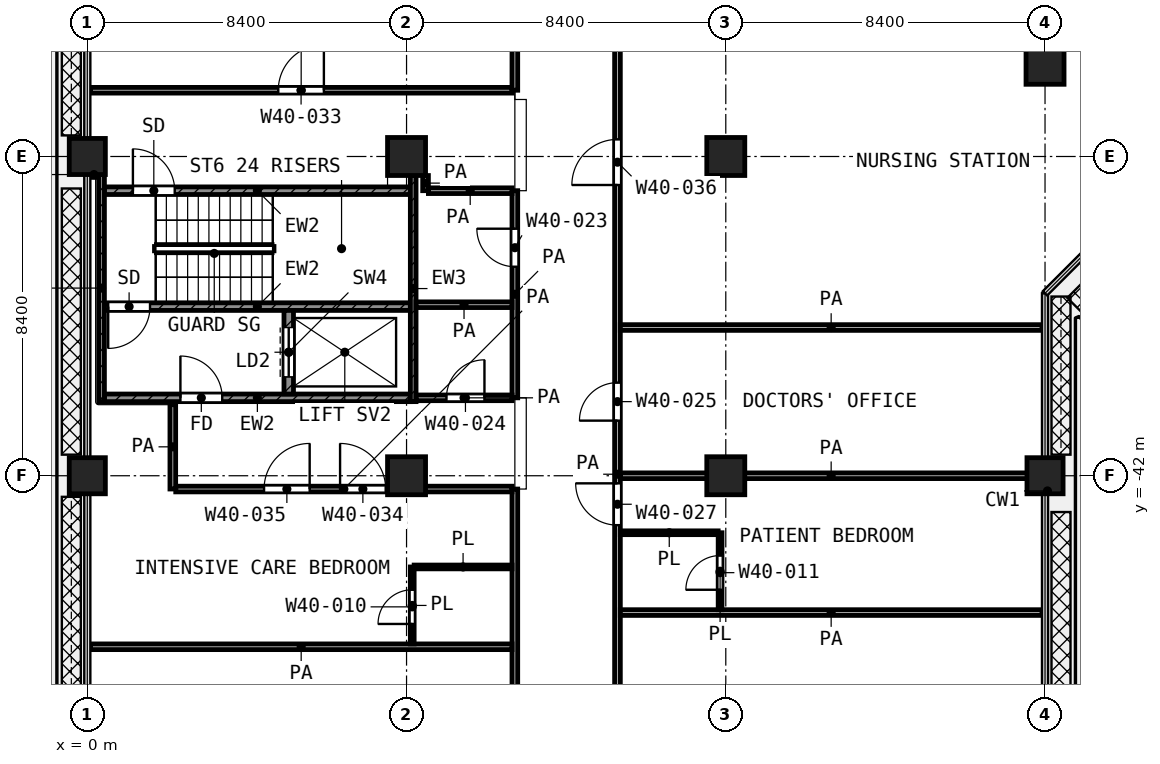
"""IFC4 building model, lengths in metres.
Left out: names, types, materials, properties, quantities, classifications, styles, units other than length and angle.
Written with IfcOpenShell. Run it as: python <this file> out.ifc"""

import sys

from ifc_helpers import new_model, si_unit, direction, frame, frame_2d, origin, origin_2d, place, context, subcontext, project, spatial, rectangle, extrude, element, fill, save


model = new_model("IFC4")
c1 = context("Model", 3, precision=1e-05, world=origin(), true_north=direction((0.0, 1.0)))
c2 = subcontext(c1, "Body", "Model", "MODEL_VIEW")
j1 = project(units=[si_unit("LENGTHUNIT", "METRE"), si_unit("PLANEANGLEUNIT", "RADIAN")], contexts=[c1])
p1 = place(None, origin())
s1 = spatial("IfcSite", under=j1, at=p1, CompositionType="ELEMENT")
p2 = place(p1, origin())
s2 = spatial("IfcBuilding", under=s1, at=p2, CompositionType="ELEMENT")
p3 = place(p2, frame((0.0, 0.0, 175.2)))
s3 = spatial("IfcBuildingStorey", under=s2, at=p3, CompositionType="ELEMENT", Elevation=175.2)
p4 = place(p3, frame((25.2, -31.2, 0.0), z_axis=(0.0, 0.0, 1.0), x_axis=(1.0, 0.0, 0.0)))
e1 = element("IfcColumn", 1, at=p4, inside=s3, PredefinedType="COLUMN", context=c2, shape_type="SweptSolid", body=[
    extrude(rectangle(XDim=1.0, YDim=1.0, at=origin_2d()), origin(), (0.0, 0.0, 1.0), 4.2),
])
p5 = place(p3, frame((0.0, -33.6, 0.0), z_axis=(0.0, 0.0, 1.0), x_axis=(1.0, 0.0, 0.0)))
e2 = element("IfcColumn", 2, at=p5, inside=s3, PredefinedType="COLUMN", context=c2, shape_type="SweptSolid", body=[
    extrude(rectangle(XDim=0.95, YDim=0.95, at=origin_2d()), origin(), (0.0, 0.0, 1.0), 4.2),
])
for number, where, z_axis, x_axis in (
    (3, (8.4, -33.6, 0.0), (0.0, 0.0, 1.0), (1.0, 0.0, 0.0)),
    (4, (16.8, -33.6, 0.0), (0.0, 0.0, 1.0), (1.0, 0.0, 0.0)),
):
    element("IfcColumn", number, at=place(p3, frame(where, z_axis=z_axis, x_axis=x_axis)), inside=s3, PredefinedType="COLUMN", context=c2, shape_type="SweptSolid", body=[
        extrude(rectangle(XDim=1.0, YDim=1.0, at=origin_2d()), origin(), (0.0, 0.0, 1.0), 4.2),
    ])
p6 = place(p3, frame((0.0, -42.0, 0.0), z_axis=(0.0, 0.0, 1.0), x_axis=(1.0, 0.0, 0.0)))
e5 = element("IfcColumn", 5, at=p6, inside=s3, PredefinedType="COLUMN", context=c2, shape_type="SweptSolid", body=[
    extrude(rectangle(XDim=0.95, YDim=0.95, at=origin_2d()), origin(), (0.0, 0.0, 1.0), 4.2),
])
for number, where, z_axis, x_axis in (
    (6, (8.4, -42.0, 0.0), (0.0, 0.0, 1.0), (1.0, 0.0, 0.0)),
    (7, (16.8, -42.0, 0.0), (0.0, 0.0, 1.0), (1.0, 0.0, 0.0)),
):
    element("IfcColumn", number, at=place(p3, frame(where, z_axis=z_axis, x_axis=x_axis)), inside=s3, PredefinedType="COLUMN", context=c2, shape_type="SweptSolid", body=[
        extrude(rectangle(XDim=1.0, YDim=1.0, at=origin_2d()), origin(), (0.0, 0.0, 1.0), 4.2),
    ])
p7 = place(p3, frame((25.2, -42.0, 0.0), z_axis=(0.0, 0.0, 1.0), x_axis=(1.0, 0.0, 0.0)))
e8 = element("IfcColumn", 8, at=p7, inside=s3, PredefinedType="COLUMN", context=c2, shape_type="SweptSolid", body=[
    extrude(rectangle(XDim=0.95, YDim=0.95, at=origin_2d()), origin(), (0.0, 0.0, 1.0), 4.2),
])
p8 = place(p3, frame((0.375, -40.05, 0.0), z_axis=(0.0, 0.0, 1.0), x_axis=(0.0, 1.0, 0.0)))
e9 = element("IfcWall", 9, at=p8, inside=s3, PredefinedType="SHEAR", context=c2, shape_type="SweptSolid", body=[
    extrude(rectangle(XDim=5.975, YDim=0.15, at=frame_2d((2.988, 0.0))), origin(), (0.0, 0.0, 1.0), 3.6),
])
p9 = place(p3, frame((8.575, -40.05, 0.0), z_axis=(0.0, 0.0, 1.0), x_axis=(0.0, 1.0, 0.0)))
e10 = element("IfcWall", 10, at=p9, inside=s3, PredefinedType="SHEAR", context=c2, shape_type="SweptSolid", body=[
    extrude(rectangle(XDim=5.95, YDim=0.15, at=frame_2d((2.975, 0.0))), origin(), (0.0, 0.0, 1.0), 3.6),
])
p10 = place(p3, frame((0.45, -34.5, 0.0), z_axis=(0.0, 0.0, 1.0), x_axis=(1.0, 0.0, 0.0)))
e11 = element("IfcWall", 11, at=p10, inside=s3, PredefinedType="SHEAR", context=c2, shape_type="SweptSolid", body=[
    extrude(rectangle(XDim=8.05, YDim=0.2, at=frame_2d((4.025, 0.0))), origin(), (0.0, 0.0, 1.0), 3.6),
])
p11 = place(p10, frame((0.75, 0.0, 0.0)))
e12 = element("IfcOpeningElement", 12, at=p11, cuts=e11, PredefinedType="OPENING", context=c2, shape_type="SweptSolid", body=[
    extrude(rectangle(XDim=1.1, YDim=2.1, at=frame_2d((0.55, 1.05))), frame((0.0, 0.11, 0.0), z_axis=(0.0, -1.0, 0.0), x_axis=(1.0, 0.0, 0.0)), (0.0, 0.0, 1.0), 0.22),
])
p12 = place(p3, frame((0.45, -37.55, 0.0), z_axis=(0.0, 0.0, 1.0), x_axis=(1.0, 0.0, 0.0)))
e13 = element("IfcWall", 13, at=p12, inside=s3, PredefinedType="SHEAR", context=c2, shape_type="SweptSolid", body=[
    extrude(rectangle(XDim=8.05, YDim=0.2, at=frame_2d((4.025, 0.0))), origin(), (0.0, 0.0, 1.0), 3.6),
])
p13 = place(p12, frame((0.1, 0.0, 0.0)))
e14 = element("IfcOpeningElement", 14, at=p13, cuts=e13, PredefinedType="OPENING", context=c2, shape_type="SweptSolid", body=[
    extrude(rectangle(XDim=1.1, YDim=2.1, at=frame_2d((0.55, 1.05))), frame((0.0, 0.11, 0.0), z_axis=(0.0, -1.0, 0.0), x_axis=(1.0, 0.0, 0.0)), (0.0, 0.0, 1.0), 0.22),
])
p14 = place(p3, frame((0.45, -39.95, 0.0), z_axis=(0.0, 0.0, 1.0), x_axis=(1.0, 0.0, 0.0)))
e15 = element("IfcWall", 15, at=p14, inside=s3, PredefinedType="SHEAR", context=c2, shape_type="SweptSolid", body=[
    extrude(rectangle(XDim=8.05, YDim=0.2, at=frame_2d((4.025, 0.0))), origin(), (0.0, 0.0, 1.0), 3.6),
])
p15 = place(p14, frame((2.0, 0.0, 0.0)))
e16 = element("IfcOpeningElement", 16, at=p15, cuts=e15, PredefinedType="OPENING", context=c2, shape_type="SweptSolid", body=[
    extrude(rectangle(XDim=1.1, YDim=2.1, at=frame_2d((0.55, 1.05))), frame((0.0, 0.11, 0.0), z_axis=(0.0, -1.0, 0.0), x_axis=(1.0, 0.0, 0.0)), (0.0, 0.0, 1.0), 0.22),
])
p16 = place(p3, frame((5.3, -39.85, 0.0), z_axis=(0.0, 0.0, 1.0), x_axis=(0.0, 1.0, 0.0)))
e17 = element("IfcWall", 17, at=p16, inside=s3, PredefinedType="SHEAR", context=c2, shape_type="SweptSolid", body=[
    extrude(rectangle(XDim=2.2, YDim=0.25, at=frame_2d((1.1, 0.0))), origin(), (0.0, 0.0, 1.0), 3.6),
])
p17 = place(p16, frame((0.45, 0.0, 0.0)))
e18 = element("IfcOpeningElement", 18, at=p17, cuts=e17, PredefinedType="OPENING", context=c2, shape_type="SweptSolid", body=[
    extrude(rectangle(XDim=1.3, YDim=2.1, at=frame_2d((0.65, 1.05))), frame((0.0, 0.135, 0.0), z_axis=(0.0, -1.0, 0.0), x_axis=(1.0, 0.0, 0.0)), (0.0, 0.0, 1.0), 0.27),
])
p18 = place(p3, frame((8.6, -44.4, 0.0), z_axis=(0.0, 0.0, 1.0), x_axis=(1.0, 0.0, 0.0)))
e19 = element("IfcWall", 19, at=p18, inside=s3, PredefinedType="PARTITIONING", context=c2, shape_type="SweptSolid", body=[
    extrude(rectangle(XDim=2.575, YDim=0.1, at=frame_2d((1.288, 0.0))), origin(), (0.0, 0.0, 1.0), 3.6),
])
p19 = place(p3, frame((14.025, -43.5, 0.0), z_axis=(0.0, 0.0, 1.0), x_axis=(1.0, 0.0, 0.0)))
e20 = element("IfcWall", 20, at=p19, inside=s3, PredefinedType="PARTITIONING", context=c2, shape_type="SweptSolid", body=[
    extrude(rectangle(XDim=2.575, YDim=0.1, at=frame_2d((1.288, 0.0))), origin(), (0.0, 0.0, 1.0), 3.6),
])
p20 = place(p3, frame((8.55, -46.425, 0.0), z_axis=(0.0, 0.0, 1.0), x_axis=(0.0, 1.0, 0.0)))
e21 = element("IfcWall", 21, at=p20, inside=s3, PredefinedType="PARTITIONING", context=c2, shape_type="SweptSolid", body=[
    extrude(rectangle(XDim=2.025, YDim=0.1, at=frame_2d((1.013, 0.0))), origin(), (0.0, 0.0, 1.0), 3.6),
])
p21 = place(p20, frame((0.525, 0.0, 0.0)))
e22 = element("IfcOpeningElement", 22, at=p21, cuts=e21, PredefinedType="OPENING", context=c2, shape_type="SweptSolid", body=[
    extrude(rectangle(XDim=0.9, YDim=2.1, at=frame_2d((0.45, 1.05))), frame((0.0, 0.06, 0.0), z_axis=(0.0, -1.0, 0.0), x_axis=(1.0, 0.0, 0.0)), (0.0, 0.0, 1.0), 0.12),
])
p22 = place(p3, frame((16.65, -45.525, 0.0), z_axis=(0.0, 0.0, 1.0), x_axis=(0.0, 1.0, 0.0)))
e23 = element("IfcWall", 23, at=p22, inside=s3, PredefinedType="PARTITIONING", context=c2, shape_type="SweptSolid", body=[
    extrude(rectangle(XDim=2.025, YDim=0.1, at=frame_2d((1.012, 0.0))), origin(), (0.0, 0.0, 1.0), 3.6),
])
p23 = place(p22, frame((0.525, 0.0, 0.0)))
e24 = element("IfcOpeningElement", 24, at=p23, cuts=e23, PredefinedType="OPENING", context=c2, shape_type="SweptSolid", body=[
    extrude(rectangle(XDim=0.9, YDim=2.1, at=frame_2d((0.45, 1.05))), frame((0.0, 0.06, 0.0), z_axis=(0.0, -1.0, 0.0), x_axis=(1.0, 0.0, 0.0)), (0.0, 0.0, 1.0), 0.12),
])
p24 = place(p3, frame((0.08, -46.5, 0.0), z_axis=(0.0, 0.0, 1.0), x_axis=(1.0, 0.0, 0.0)))
e25 = element("IfcWall", 25, at=p24, inside=s3, PredefinedType="PARTITIONING", context=c2, shape_type="SweptSolid", body=[
    extrude(rectangle(XDim=11.095, YDim=0.15, at=frame_2d((5.547, 0.0))), origin(), (0.0, 0.0, 1.0), 3.6),
])
p25 = place(p3, frame((14.025, -45.6, 0.0), z_axis=(0.0, 0.0, 1.0), x_axis=(1.0, 0.0, 0.0)))
e26 = element("IfcWall", 26, at=p25, inside=s3, PredefinedType="PARTITIONING", context=c2, shape_type="SweptSolid", body=[
    extrude(rectangle(XDim=11.095, YDim=0.15, at=frame_2d((5.548, 0.0))), origin(), (0.0, 0.0, 1.0), 3.6),
])
p26 = place(p3, frame((2.327, -42.35, 0.0), z_axis=(0.0, 0.0, 1.0), x_axis=(1.0, 0.0, 0.0)))
e27 = element("IfcWall", 27, at=p26, inside=s3, PredefinedType="PARTITIONING", context=c2, shape_type="SweptSolid", body=[
    extrude(rectangle(XDim=8.848, YDim=0.15, at=frame_2d((4.424, 0.0))), origin(), (0.0, 0.0, 1.0), 3.6),
])
p27 = place(p26, frame((4.324, 0.0, 0.0)))
e28 = element("IfcOpeningElement", 28, at=p27, cuts=e27, PredefinedType="OPENING", context=c2, shape_type="SweptSolid", body=[
    extrude(rectangle(XDim=1.2, YDim=2.1, at=frame_2d((0.6, 1.05))), frame((0.0, 0.085, 0.0), z_axis=(0.0, -1.0, 0.0), x_axis=(1.0, 0.0, 0.0)), (0.0, 0.0, 1.0), 0.17),
])
p28 = place(p26, frame((2.324, 0.0, 0.0)))
e29 = element("IfcOpeningElement", 29, at=p28, cuts=e27, PredefinedType="OPENING", context=c2, shape_type="SweptSolid", body=[
    extrude(rectangle(XDim=1.2, YDim=2.1, at=frame_2d((0.6, 1.05))), frame((0.0, 0.085, 0.0), z_axis=(0.0, -1.0, 0.0), x_axis=(1.0, 0.0, 0.0)), (0.0, 0.0, 1.0), 0.17),
])
p29 = place(p3, frame((14.025, -42.0, 0.0), z_axis=(0.0, 0.0, 1.0), x_axis=(1.0, 0.0, 0.0)))
e30 = element("IfcWall", 30, at=p29, inside=s3, PredefinedType="PARTITIONING", context=c2, shape_type="SweptSolid", body=[
    extrude(rectangle(XDim=11.095, YDim=0.15, at=frame_2d((5.548, 0.0))), origin(), (0.0, 0.0, 1.0), 3.6),
])
p30 = place(p3, frame((8.65, -39.95, 0.0), z_axis=(0.0, 0.0, 1.0), x_axis=(1.0, 0.0, 0.0)))
e31 = element("IfcWall", 31, at=p30, inside=s3, PredefinedType="PARTITIONING", context=c2, shape_type="SweptSolid", body=[
    extrude(rectangle(XDim=2.525, YDim=0.15, at=frame_2d((1.263, 0.0))), origin(), (0.0, 0.0, 1.0), 3.6),
])
p31 = place(p30, frame((0.8, 0.0, 0.0)))
e32 = element("IfcOpeningElement", 32, at=p31, cuts=e31, PredefinedType="OPENING", context=c2, shape_type="SweptSolid", body=[
    extrude(rectangle(XDim=1.0, YDim=2.1, at=frame_2d((0.5, 1.05))), frame((0.0, 0.085, 0.0), z_axis=(0.0, -1.0, 0.0), x_axis=(1.0, 0.0, 0.0)), (0.0, 0.0, 1.0), 0.17),
])
p32 = place(p3, frame((14.025, -38.1, 0.0), z_axis=(0.0, 0.0, 1.0), x_axis=(1.0, 0.0, 0.0)))
e33 = element("IfcWall", 33, at=p32, inside=s3, PredefinedType="PARTITIONING", context=c2, shape_type="SweptSolid", body=[
    extrude(rectangle(XDim=11.095, YDim=0.15, at=frame_2d((5.548, 0.0))), origin(), (0.0, 0.0, 1.0), 3.6),
])
p33 = place(p3, frame((8.65, -37.5, 0.0), z_axis=(0.0, 0.0, 1.0), x_axis=(1.0, 0.0, 0.0)))
e34 = element("IfcWall", 34, at=p33, inside=s3, PredefinedType="PARTITIONING", context=c2, shape_type="SweptSolid", body=[
    extrude(rectangle(XDim=2.525, YDim=0.15, at=frame_2d((1.263, 0.0))), origin(), (0.0, 0.0, 1.0), 3.6),
])
p34 = place(p3, frame((8.975, -34.5, 0.0), z_axis=(0.0, 0.0, 1.0), x_axis=(1.0, 0.0, 0.0)))
e35 = element("IfcWall", 35, at=p34, inside=s3, PredefinedType="PARTITIONING", context=c2, shape_type="SweptSolid", body=[
    extrude(rectangle(XDim=2.2, YDim=0.15, at=frame_2d((1.1, 0.0))), origin(), (0.0, 0.0, 1.0), 3.6),
])
p35 = place(p3, frame((0.08, -34.075, 0.0), z_axis=(0.0, 0.0, 1.0), x_axis=(1.0, 0.0, 0.0)))
e36 = element("IfcWall", 36, at=p35, inside=s3, PredefinedType="PARTITIONING", context=c2, shape_type="SweptSolid", body=[
    extrude(rectangle(XDim=0.19, YDim=0.15, at=frame_2d((0.095, 0.0))), origin(), (0.0, 0.0, 1.0), 3.6),
])
p36 = place(p3, frame((0.08, -31.857, 0.0), z_axis=(0.0, 0.0, 1.0), x_axis=(1.0, 0.0, 0.0)))
e37 = element("IfcWall", 37, at=p36, inside=s3, PredefinedType="PARTITIONING", context=c2, shape_type="SweptSolid", body=[
    extrude(rectangle(XDim=11.095, YDim=0.15, at=frame_2d((5.547, 0.0))), origin(), (0.0, 0.0, 1.0), 3.6),
])
p37 = place(p36, frame((4.945, 0.0, 0.0)))
e38 = element("IfcOpeningElement", 38, at=p37, cuts=e37, PredefinedType="OPENING", context=c2, shape_type="SweptSolid", body=[
    extrude(rectangle(XDim=1.2, YDim=2.1, at=frame_2d((0.6, 1.05))), frame((0.0, 0.085, 0.0), z_axis=(0.0, -1.0, 0.0), x_axis=(1.0, 0.0, 0.0)), (0.0, 0.0, 1.0), 0.17),
])
p38 = place(p3, frame((2.25, -42.349, 0.0), z_axis=(0.0, 0.0, 1.0), x_axis=(0.0, 1.0, 0.0)))
e39 = element("IfcWall", 39, at=p38, inside=s3, PredefinedType="PARTITIONING", context=c2, shape_type="SweptSolid", body=[
    extrude(rectangle(XDim=2.219, YDim=0.15, at=frame_2d((1.11, 0.0))), origin(), (0.0, 0.0, 1.0), 3.6),
])
p39 = place(p3, frame((8.9, -34.5, 0.0), z_axis=(0.0, 0.0, 1.0), x_axis=(0.0, 1.0, 0.0)))
e40 = element("IfcWall", 40, at=p39, inside=s3, PredefinedType="PARTITIONING", context=c2, shape_type="SweptSolid", body=[
    extrude(rectangle(XDim=0.399, YDim=0.15, at=frame_2d((0.199, 0.0))), origin(), (0.0, 0.0, 1.0), 3.6),
])
p40 = place(p3, frame((11.25, -54.52, 0.0), z_axis=(0.0, 0.0, 1.0), x_axis=(0.0, 1.0, 0.0)))
e41 = element("IfcWall", 41, at=p40, inside=s3, PredefinedType="PARTITIONING", context=c2, shape_type="SweptSolid", body=[
    extrude(rectangle(XDim=12.17, YDim=0.15, at=frame_2d((6.085, 0.0))), origin(), (0.0, 0.0, 1.0), 3.6),
])
p41 = place(p40, frame((3.22, 0.0, 0.0)))
e42 = element("IfcOpeningElement", 42, at=p41, cuts=e41, PredefinedType="OPENING", context=c2, shape_type="SweptSolid", body=[
    extrude(rectangle(XDim=1.5, YDim=2.1, at=frame_2d((0.75, 1.05))), frame((0.0, 0.085, 0.0), z_axis=(0.0, -1.0, 0.0), x_axis=(1.0, 0.0, 0.0)), (0.0, 0.0, 1.0), 0.17),
])
p42 = place(p3, frame((11.25, -39.95, 0.0), z_axis=(0.0, 0.0, 1.0), x_axis=(0.0, 1.0, 0.0)))
e43 = element("IfcWall", 43, at=p42, inside=s3, PredefinedType="PARTITIONING", context=c2, shape_type="SweptSolid", body=[
    extrude(rectangle(XDim=5.45, YDim=0.15, at=frame_2d((2.725, 0.0))), origin(), (0.0, 0.0, 1.0), 3.6),
])
p43 = place(p42, frame((3.45, 0.0, 0.0)))
e44 = element("IfcOpeningElement", 44, at=p43, cuts=e43, PredefinedType="OPENING", context=c2, shape_type="SweptSolid", body=[
    extrude(rectangle(XDim=1.0, YDim=2.1, at=frame_2d((0.5, 1.05))), frame((0.0, 0.085, 0.0), z_axis=(0.0, -1.0, 0.0), x_axis=(1.0, 0.0, 0.0)), (0.0, 0.0, 1.0), 0.17),
])
p44 = place(p3, frame((11.25, -31.857, 0.0), z_axis=(0.0, 0.0, 1.0), x_axis=(0.0, 1.0, 0.0)))
e45 = element("IfcWall", 45, at=p44, inside=s3, PredefinedType="PARTITIONING", context=c2, shape_type="SweptSolid", body=[
    extrude(rectangle(XDim=2.457, YDim=0.15, at=frame_2d((1.229, 0.0))), origin(), (0.0, 0.0, 1.0), 3.6),
])
p45 = place(p3, frame((13.95, -54.52, 0.0), z_axis=(0.0, 0.0, 1.0), x_axis=(0.0, 1.0, 0.0)))
e46 = element("IfcWall", 46, at=p45, inside=s3, PredefinedType="PARTITIONING", context=c2, shape_type="SweptSolid", body=[
    extrude(rectangle(XDim=25.12, YDim=0.15, at=frame_2d((12.56, 0.0))), origin(), (0.0, 0.0, 1.0), 3.6),
])
p46 = place(p45, frame((20.17, 0.0, 0.0)))
e47 = element("IfcOpeningElement", 47, at=p46, cuts=e46, PredefinedType="OPENING", context=c2, shape_type="SweptSolid", body=[
    extrude(rectangle(XDim=1.2, YDim=2.1, at=frame_2d((0.6, 1.05))), frame((0.0, 0.085, 0.0), z_axis=(0.0, -1.0, 0.0), x_axis=(1.0, 0.0, 0.0)), (0.0, 0.0, 1.0), 0.17),
])
p47 = place(p45, frame((13.97, 0.0, 0.0)))
e48 = element("IfcOpeningElement", 48, at=p47, cuts=e46, PredefinedType="OPENING", context=c2, shape_type="SweptSolid", body=[
    extrude(rectangle(XDim=1.0, YDim=2.1, at=frame_2d((0.5, 1.05))), frame((0.0, 0.085, 0.0), z_axis=(0.0, -1.0, 0.0), x_axis=(1.0, 0.0, 0.0)), (0.0, 0.0, 1.0), 0.17),
])
p48 = place(p45, frame((11.22, 0.0, 0.0)))
e49 = element("IfcOpeningElement", 49, at=p48, cuts=e46, PredefinedType="OPENING", context=c2, shape_type="SweptSolid", body=[
    extrude(rectangle(XDim=1.1, YDim=2.1, at=frame_2d((0.55, 1.05))), frame((0.0, 0.085, 0.0), z_axis=(0.0, -1.0, 0.0), x_axis=(1.0, 0.0, 0.0)), (0.0, 0.0, 1.0), 0.17),
])
p49 = place(p45, frame((3.67, 0.0, 0.0)))
e50 = element("IfcOpeningElement", 50, at=p49, cuts=e46, PredefinedType="OPENING", context=c2, shape_type="SweptSolid", body=[
    extrude(rectangle(XDim=1.5, YDim=2.1, at=frame_2d((0.75, 1.05))), frame((0.0, 0.085, 0.0), z_axis=(0.0, -1.0, 0.0), x_axis=(1.0, 0.0, 0.0)), (0.0, 0.0, 1.0), 0.17),
])
p50 = place(p11, origin())
e51 = element("IfcDoor", 51, at=p50, inside=s3, OperationType="SINGLE_SWING_LEFT", PredefinedType="DOOR", context=c2, shape_type="SweptSolid", body=[
    extrude(rectangle(XDim=1.1, YDim=2.1, at=frame_2d((0.55, 1.05))), frame((0.0, 0.025, 0.0), z_axis=(0.0, -1.0, 0.0), x_axis=(1.0, 0.0, 0.0)), (0.0, 0.0, 1.0), 0.05),
])
fill(e12, e51)
p51 = place(p13, frame((1.1, 0.0, 0.0), z_axis=(0.0, 0.0, 1.0), x_axis=(-1.0, 0.0, 0.0)))
e52 = element("IfcDoor", 52, at=p51, inside=s3, OperationType="SINGLE_SWING_LEFT", PredefinedType="DOOR", context=c2, shape_type="SweptSolid", body=[
    extrude(rectangle(XDim=1.1, YDim=2.1, at=frame_2d((0.55, 1.05))), frame((0.0, 0.025, 0.0), z_axis=(0.0, -1.0, 0.0), x_axis=(1.0, 0.0, 0.0)), (0.0, 0.0, 1.0), 0.05),
])
fill(e14, e52)
p52 = place(p17, origin())
e53 = element("IfcDoor", 53, at=p52, inside=s3, OperationType="DOUBLE_DOOR_SLIDING", PredefinedType="DOOR", context=c2, shape_type="SweptSolid", body=[
    extrude(rectangle(XDim=1.3, YDim=2.1, at=frame_2d((0.65, 1.05))), frame((0.0, 0.025, 0.0), z_axis=(0.0, -1.0, 0.0), x_axis=(1.0, 0.0, 0.0)), (0.0, 0.0, 1.0), 0.05),
])
fill(e18, e53)
p53 = place(p15, origin())
e54 = element("IfcDoor", 54, at=p53, inside=s3, OperationType="SINGLE_SWING_LEFT", PredefinedType="DOOR", context=c2, shape_type="SweptSolid", body=[
    extrude(rectangle(XDim=1.1, YDim=2.1, at=frame_2d((0.55, 1.05))), frame((0.0, 0.025, 0.0), z_axis=(0.0, -1.0, 0.0), x_axis=(1.0, 0.0, 0.0)), (0.0, 0.0, 1.0), 0.05),
])
fill(e16, e54)
p54 = place(p37, origin())
e55 = element("IfcDoor", 55, at=p54, inside=s3, OperationType="SINGLE_SWING_RIGHT", PredefinedType="DOOR", context=c2, shape_type="SweptSolid", body=[
    extrude(rectangle(XDim=1.2, YDim=2.1, at=frame_2d((0.6, 1.05))), frame((0.0, 0.025, 0.0), z_axis=(0.0, -1.0, 0.0), x_axis=(1.0, 0.0, 0.0)), (0.0, 0.0, 1.0), 0.05),
])
fill(e38, e55)
p55 = place(p43, origin())
e56 = element("IfcDoor", 56, at=p55, inside=s3, OperationType="SINGLE_SWING_RIGHT", PredefinedType="DOOR", context=c2, shape_type="SweptSolid", body=[
    extrude(rectangle(XDim=1.0, YDim=2.1, at=frame_2d((0.5, 1.05))), frame((0.0, 0.025, 0.0), z_axis=(0.0, -1.0, 0.0), x_axis=(1.0, 0.0, 0.0)), (0.0, 0.0, 1.0), 0.05),
])
fill(e44, e56)
p56 = place(p31, origin())
e57 = element("IfcDoor", 57, at=p56, inside=s3, OperationType="SINGLE_SWING_RIGHT", PredefinedType="DOOR", context=c2, shape_type="SweptSolid", body=[
    extrude(rectangle(XDim=1.0, YDim=2.1, at=frame_2d((0.5, 1.05))), frame((0.0, 0.025, 0.0), z_axis=(0.0, -1.0, 0.0), x_axis=(1.0, 0.0, 0.0)), (0.0, 0.0, 1.0), 0.05),
])
fill(e32, e57)
p57 = place(p27, origin())
e58 = element("IfcDoor", 58, at=p57, inside=s3, OperationType="SINGLE_SWING_LEFT", PredefinedType="DOOR", context=c2, shape_type="SweptSolid", body=[
    extrude(rectangle(XDim=1.2, YDim=2.1, at=frame_2d((0.6, 1.05))), frame((0.0, 0.025, 0.0), z_axis=(0.0, -1.0, 0.0), x_axis=(1.0, 0.0, 0.0)), (0.0, 0.0, 1.0), 0.05),
])
fill(e28, e58)
p58 = place(p28, origin())
e59 = element("IfcDoor", 59, at=p58, inside=s3, OperationType="SINGLE_SWING_RIGHT", PredefinedType="DOOR", context=c2, shape_type="SweptSolid", body=[
    extrude(rectangle(XDim=1.2, YDim=2.1, at=frame_2d((0.6, 1.05))), frame((0.0, 0.025, 0.0), z_axis=(0.0, -1.0, 0.0), x_axis=(1.0, 0.0, 0.0)), (0.0, 0.0, 1.0), 0.05),
])
fill(e29, e59)
p59 = place(p21, origin())
e60 = element("IfcDoor", 60, at=p59, inside=s3, OperationType="SINGLE_SWING_LEFT", PredefinedType="DOOR", context=c2, shape_type="SweptSolid", body=[
    extrude(rectangle(XDim=0.9, YDim=2.1, at=frame_2d((0.45, 1.05))), frame((0.0, 0.025, 0.0), z_axis=(0.0, -1.0, 0.0), x_axis=(1.0, 0.0, 0.0)), (0.0, 0.0, 1.0), 0.05),
])
fill(e22, e60)
p60 = place(p46, origin())
e61 = element("IfcDoor", 61, at=p60, inside=s3, OperationType="SINGLE_SWING_LEFT", PredefinedType="DOOR", context=c2, shape_type="SweptSolid", body=[
    extrude(rectangle(XDim=1.2, YDim=2.1, at=frame_2d((0.6, 1.05))), frame((0.0, 0.025, 0.0), z_axis=(0.0, -1.0, 0.0), x_axis=(1.0, 0.0, 0.0)), (0.0, 0.0, 1.0), 0.05),
])
fill(e47, e61)
p61 = place(p47, origin())
e62 = element("IfcDoor", 62, at=p61, inside=s3, OperationType="SINGLE_SWING_LEFT", PredefinedType="DOOR", context=c2, shape_type="SweptSolid", body=[
    extrude(rectangle(XDim=1.0, YDim=2.1, at=frame_2d((0.5, 1.05))), frame((0.0, 0.025, 0.0), z_axis=(0.0, -1.0, 0.0), x_axis=(1.0, 0.0, 0.0)), (0.0, 0.0, 1.0), 0.05),
])
fill(e48, e62)
p62 = place(p48, origin())
e63 = element("IfcDoor", 63, at=p62, inside=s3, OperationType="SINGLE_SWING_RIGHT", PredefinedType="DOOR", context=c2, shape_type="SweptSolid", body=[
    extrude(rectangle(XDim=1.1, YDim=2.1, at=frame_2d((0.55, 1.05))), frame((0.0, 0.025, 0.0), z_axis=(0.0, -1.0, 0.0), x_axis=(1.0, 0.0, 0.0)), (0.0, 0.0, 1.0), 0.05),
])
fill(e49, e63)
p63 = place(p23, origin())
e64 = element("IfcDoor", 64, at=p63, inside=s3, OperationType="SINGLE_SWING_LEFT", PredefinedType="DOOR", context=c2, shape_type="SweptSolid", body=[
    extrude(rectangle(XDim=0.9, YDim=2.1, at=frame_2d((0.45, 1.05))), frame((0.0, 0.025, 0.0), z_axis=(0.0, -1.0, 0.0), x_axis=(1.0, 0.0, 0.0)), (0.0, 0.0, 1.0), 0.05),
])
fill(e24, e64)
save(model, sys.argv[1])
